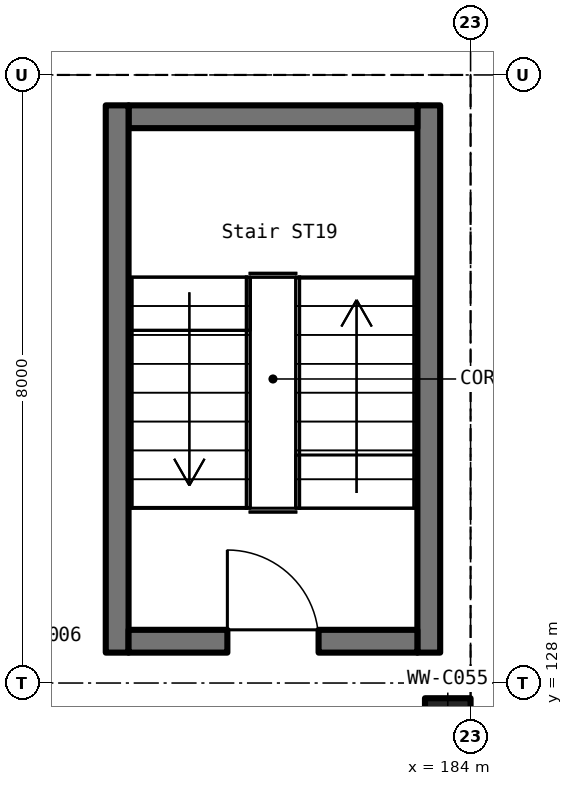
"""IFC4 building model, lengths in metres.
Left out: names, types, materials, properties, quantities, classifications, styles, units other than length and angle.
Written with IfcOpenShell. Run it as: python <this file> out.ifc"""

import sys

from ifc_helpers import new_model, si_unit, direction, frame, frame_2d, origin, origin_2d, place, context, subcontext, project, spatial, rectangle, extrude, element, fill, save


model = new_model("IFC4")
c1 = context("Model", 3, precision=1e-05, world=origin(), true_north=direction((0.0, 1.0)))
c2 = subcontext(c1, "Body", "Model", "MODEL_VIEW")
j1 = project(units=[si_unit("LENGTHUNIT", "METRE"), si_unit("PLANEANGLEUNIT", "RADIAN")], contexts=[c1])
p1 = place(None, origin())
s1 = spatial("IfcSite", under=j1, at=p1, CompositionType="ELEMENT")
p2 = place(p1, origin())
s2 = spatial("IfcBuilding", under=s1, at=p2, CompositionType="ELEMENT")
p3 = place(p2, frame((0.0, 0.0, -6.0)))
s3 = spatial("IfcBuildingStorey", under=s2, at=p3, CompositionType="ELEMENT", Elevation=-6.0)
p4 = place(p3, frame((183.7, 127.5, 0.0), z_axis=(0.0, 0.0, 1.0), x_axis=(1.0, 0.0, 0.0)))
e1 = element("IfcColumn", 1, at=p4, inside=s3, PredefinedType="COLUMN", context=c2, shape_type="SweptSolid", body=[
    extrude(rectangle(XDim=0.6, YDim=0.6, at=origin_2d()), origin(), (0.0, 0.0, 1.0), 6.0),
])
p5 = place(p3, frame((183.45, 128.4, 0.0), z_axis=(0.0, 0.0, 1.0), x_axis=(0.0, 1.0, 0.0)))
e2 = element("IfcWall", 2, at=p5, inside=s3, PredefinedType="SOLIDWALL", context=c2, shape_type="SweptSolid", body=[
    extrude(rectangle(XDim=7.2, YDim=0.3, at=frame_2d((3.6, 0.0))), origin(), (0.0, 0.0, 1.0), 6.0),
])
p6 = place(p3, frame((183.3, 135.45, 0.0), z_axis=(0.0, 0.0, 1.0), x_axis=(-1.0, 0.0, 0.0)))
e3 = element("IfcWall", 3, at=p6, inside=s3, PredefinedType="SOLIDWALL", context=c2, shape_type="SweptSolid", body=[
    extrude(rectangle(XDim=3.8, YDim=0.3, at=frame_2d((1.9, 0.0))), origin(), (0.0, 0.0, 1.0), 6.0),
])
p7 = place(p3, frame((179.35, 135.6, 0.0), z_axis=(0.0, 0.0, 1.0), x_axis=(0.0, -1.0, 0.0)))
e4 = element("IfcWall", 4, at=p7, inside=s3, PredefinedType="SOLIDWALL", context=c2, shape_type="SweptSolid", body=[
    extrude(rectangle(XDim=7.2, YDim=0.3, at=frame_2d((3.6, 0.0))), origin(), (0.0, 0.0, 1.0), 6.0),
])
p8 = place(p3, frame((179.5, 128.55, 0.0), z_axis=(0.0, 0.0, 1.0), x_axis=(1.0, 0.0, 0.0)))
e5 = element("IfcWall", 5, at=p8, inside=s3, PredefinedType="SOLIDWALL", context=c2, shape_type="SweptSolid", body=[
    extrude(rectangle(XDim=3.8, YDim=0.3, at=frame_2d((1.9, 0.0))), origin(), (0.0, 0.0, 1.0), 6.0),
])
p9 = place(p8, frame((1.3, 0.0, 0.0)))
e6 = element("IfcOpeningElement", 6, at=p9, cuts=e5, PredefinedType="OPENING", context=c2, shape_type="SweptSolid", body=[
    extrude(rectangle(XDim=1.2, YDim=2.1, at=frame_2d((0.6, 1.05))), frame((0.0, 0.162, 0.0), z_axis=(0.0, -1.0, 0.0), x_axis=(1.0, 0.0, 0.0)), (0.0, 0.0, 1.0), 0.324),
])
p10 = place(p9, origin())
e7 = element("IfcDoor", 7, at=p10, inside=s3, OperationType="SINGLE_SWING_LEFT", PredefinedType="DOOR", context=c2, shape_type="SweptSolid", body=[
    extrude(rectangle(XDim=1.2, YDim=2.1, at=frame_2d((0.6, 1.05))), frame((0.0, 0.025, 0.0), z_axis=(0.0, -1.0, 0.0), x_axis=(1.0, 0.0, 0.0)), (0.0, 0.0, 1.0), 0.05),
])
fill(e6, e7)
save(model, sys.argv[1])
